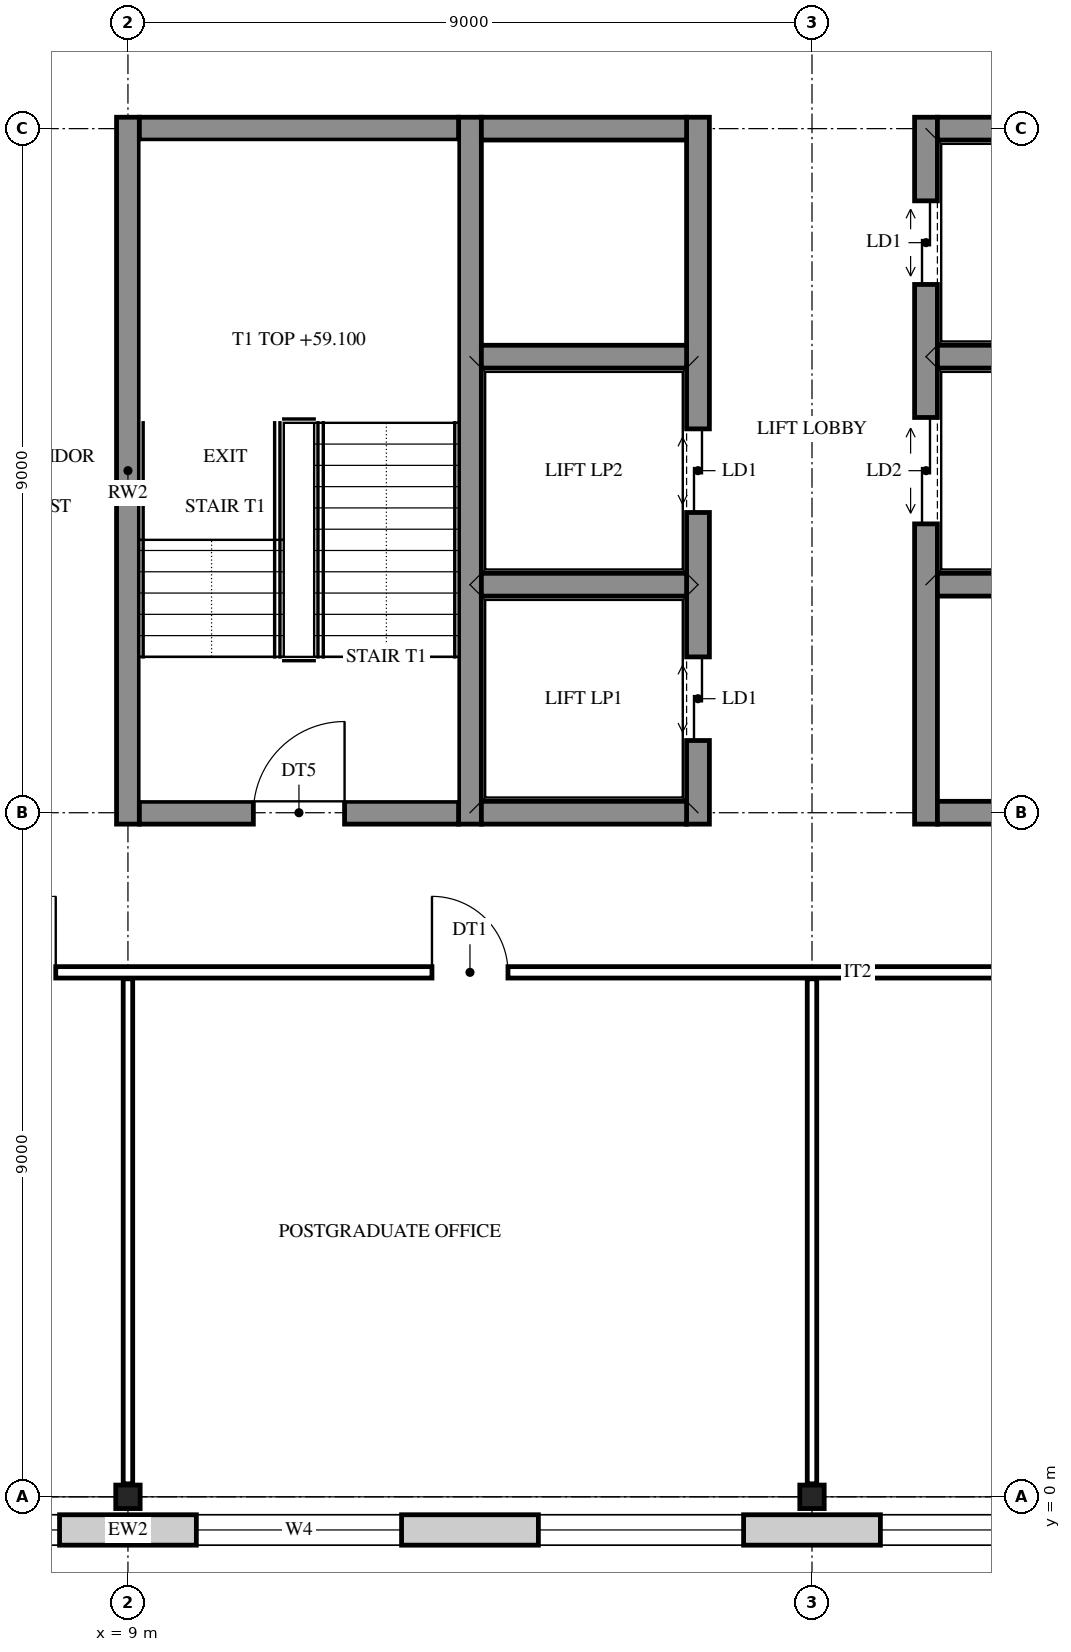
"""IFC4 building model, lengths in metres.
Left out: names, types, materials, properties, quantities, classifications, styles, units other than length and angle.
Written with IfcOpenShell. Run it as: python <this file> out.ifc"""

import sys

from ifc_helpers import new_model, si_unit, direction, frame, frame_2d, origin, origin_2d, place, context, subcontext, project, spatial, rectangle, i_section, extrude, element, fill, save


model = new_model("IFC4")
c1 = context("Model", 3, precision=1e-05, world=origin(), true_north=direction((0.0, 1.0)))
c2 = subcontext(c1, "Body", "Model", "MODEL_VIEW")
j1 = project(units=[si_unit("LENGTHUNIT", "METRE"), si_unit("PLANEANGLEUNIT", "RADIAN")], contexts=[c1])
p1 = place(None, origin())
s1 = spatial("IfcSite", under=j1, at=p1, CompositionType="ELEMENT")
p2 = place(p1, origin())
s2 = spatial("IfcBuilding", under=s1, at=p2, CompositionType="ELEMENT")
p3 = place(p2, frame((0.0, 0.0, 57.0)))
s3 = spatial("IfcBuildingStorey", under=s2, at=p3, CompositionType="ELEMENT", Elevation=57.0)
for number, where, z_axis, x_axis in (
    (1, (9.0, 0.0, 0.0), (0.0, 0.0, 1.0), (0.0, 1.0, 0.0)),
    (2, (18.0, 0.0, 0.0), (0.0, 0.0, 1.0), (0.0, 1.0, 0.0)),
):
    element("IfcColumn", number, at=place(p3, frame(where, z_axis=z_axis, x_axis=x_axis)), inside=s3, PredefinedType="COLUMN", context=c2, shape_type="SweptSolid", body=[
        extrude(i_section(OverallWidth=0.309, OverallDepth=0.321, WebThickness=0.014, FlangeThickness=0.022, FilletRadius=0.017, at=origin_2d()), origin(), (0.0, 0.0, 1.0), 4.2),
    ])
for number, where, z_axis, x_axis in (
    (3, (9.0, 8.85, 0.0), (0.0, 0.0, 1.0), (0.0, 1.0, 0.0)),
    (4, (13.5, 8.85, 0.0), (0.0, 0.0, 1.0), (0.0, 1.0, 0.0)),
):
    element("IfcWall", number, at=place(p3, frame(where, z_axis=z_axis, x_axis=x_axis)), inside=s3, PredefinedType="SHEAR", context=c2, shape_type="SweptSolid", body=[
        extrude(rectangle(XDim=9.3, YDim=0.3, at=frame_2d((4.65, 0.0))), origin(), (0.0, 0.0, 1.0), 4.2),
    ])
p4 = place(p3, frame((16.5, 8.85, 0.0), z_axis=(0.0, 0.0, 1.0), x_axis=(0.0, 1.0, 0.0)))
e5 = element("IfcWall", 5, at=p4, inside=s3, PredefinedType="SHEAR", context=c2, shape_type="SweptSolid", body=[
    extrude(rectangle(XDim=9.3, YDim=0.3, at=frame_2d((4.65, 0.0))), origin(), (0.0, 0.0, 1.0), 4.2),
])
p5 = place(p4, frame((1.1, 0.0, 0.0)))
e6 = element("IfcOpeningElement", 6, at=p5, cuts=e5, PredefinedType="OPENING", context=c2, shape_type="SweptSolid", body=[
    extrude(rectangle(XDim=1.1, YDim=2.1, at=frame_2d((0.55, 1.05))), frame((0.0, 0.16, 0.0), z_axis=(0.0, -1.0, 0.0), x_axis=(1.0, 0.0, 0.0)), (0.0, 0.0, 1.0), 0.32),
])
p6 = place(p4, frame((4.1, 0.0, 0.0)))
e7 = element("IfcOpeningElement", 7, at=p6, cuts=e5, PredefinedType="OPENING", context=c2, shape_type="SweptSolid", body=[
    extrude(rectangle(XDim=1.1, YDim=2.1, at=frame_2d((0.55, 1.05))), frame((0.0, 0.16, 0.0), z_axis=(0.0, -1.0, 0.0), x_axis=(1.0, 0.0, 0.0)), (0.0, 0.0, 1.0), 0.32),
])
p7 = place(p3, frame((19.5, 8.85, 0.0), z_axis=(0.0, 0.0, 1.0), x_axis=(0.0, 1.0, 0.0)))
e8 = element("IfcWall", 8, at=p7, inside=s3, PredefinedType="SHEAR", context=c2, shape_type="SweptSolid", body=[
    extrude(rectangle(XDim=9.3, YDim=0.3, at=frame_2d((4.65, 0.0))), origin(), (0.0, 0.0, 1.0), 4.2),
])
p8 = place(p7, frame((3.95, 0.0, 0.0)))
e9 = element("IfcOpeningElement", 9, at=p8, cuts=e8, PredefinedType="OPENING", context=c2, shape_type="SweptSolid", body=[
    extrude(rectangle(XDim=1.4, YDim=2.1, at=frame_2d((0.7, 1.05))), frame((0.0, 0.16, 0.0), z_axis=(0.0, -1.0, 0.0), x_axis=(1.0, 0.0, 0.0)), (0.0, 0.0, 1.0), 0.32),
])
p9 = place(p7, frame((7.1, 0.0, 0.0)))
e10 = element("IfcOpeningElement", 10, at=p9, cuts=e8, PredefinedType="OPENING", context=c2, shape_type="SweptSolid", body=[
    extrude(rectangle(XDim=1.1, YDim=2.1, at=frame_2d((0.55, 1.05))), frame((0.0, 0.16, 0.0), z_axis=(0.0, -1.0, 0.0), x_axis=(1.0, 0.0, 0.0)), (0.0, 0.0, 1.0), 0.32),
])
p10 = place(p3, frame((9.15, 9.0, 0.0), z_axis=(0.0, 0.0, 1.0), x_axis=(1.0, 0.0, 0.0)))
e11 = element("IfcWall", 11, at=p10, inside=s3, PredefinedType="SHEAR", context=c2, shape_type="SweptSolid", body=[
    extrude(rectangle(XDim=4.2, YDim=0.3, at=frame_2d((2.1, 0.0))), origin(), (0.0, 0.0, 1.0), 4.2),
])
p11 = place(p10, frame((1.5, 0.0, 0.0)))
e12 = element("IfcOpeningElement", 12, at=p11, cuts=e11, PredefinedType="OPENING", context=c2, shape_type="SweptSolid", body=[
    extrude(rectangle(XDim=1.2, YDim=2.1, at=frame_2d((0.6, 1.05))), frame((0.0, 0.16, 0.0), z_axis=(0.0, -1.0, 0.0), x_axis=(1.0, 0.0, 0.0)), (0.0, 0.0, 1.0), 0.32),
])
for number, where, z_axis, x_axis in (
    (13, (13.65, 9.0, 0.0), (0.0, 0.0, 1.0), (1.0, 0.0, 0.0)),
    (14, (19.65, 9.0, 0.0), (0.0, 0.0, 1.0), (1.0, 0.0, 0.0)),
    (15, (13.65, 12.0, 0.0), (0.0, 0.0, 1.0), (1.0, 0.0, 0.0)),
    (16, (19.65, 12.0, 0.0), (0.0, 0.0, 1.0), (1.0, 0.0, 0.0)),
    (17, (13.65, 15.0, 0.0), (0.0, 0.0, 1.0), (1.0, 0.0, 0.0)),
    (18, (19.65, 15.0, 0.0), (0.0, 0.0, 1.0), (1.0, 0.0, 0.0)),
):
    element("IfcWall", number, at=place(p3, frame(where, z_axis=z_axis, x_axis=x_axis)), inside=s3, PredefinedType="SHEAR", context=c2, shape_type="SweptSolid", body=[
        extrude(rectangle(XDim=2.7, YDim=0.3, at=frame_2d((1.35, 0.0))), origin(), (0.0, 0.0, 1.0), 4.2),
    ])
p12 = place(p3, frame((9.15, 18.0, 0.0), z_axis=(0.0, 0.0, 1.0), x_axis=(1.0, 0.0, 0.0)))
e19 = element("IfcWall", 19, at=p12, inside=s3, PredefinedType="SHEAR", context=c2, shape_type="SweptSolid", body=[
    extrude(rectangle(XDim=4.2, YDim=0.3, at=frame_2d((2.1, 0.0))), origin(), (0.0, 0.0, 1.0), 4.2),
])
for number, where, z_axis, x_axis in (
    (20, (13.65, 18.0, 0.0), (0.0, 0.0, 1.0), (1.0, 0.0, 0.0)),
    (21, (19.65, 18.0, 0.0), (0.0, 0.0, 1.0), (1.0, 0.0, 0.0)),
):
    element("IfcWall", number, at=place(p3, frame(where, z_axis=z_axis, x_axis=x_axis)), inside=s3, PredefinedType="SHEAR", context=c2, shape_type="SweptSolid", body=[
        extrude(rectangle(XDim=2.7, YDim=0.3, at=frame_2d((1.35, 0.0))), origin(), (0.0, 0.0, 1.0), 4.2),
    ])
p13 = place(p3, frame((32.125, -0.436, 0.0), z_axis=(0.0, 0.0, 1.0), x_axis=(-1.0, 0.0, 0.0)))
e22 = element("IfcWall", 22, at=p13, inside=s3, PredefinedType="STANDARD", context=c2, shape_type="SweptSolid", body=[
    extrude(rectangle(XDim=32.75, YDim=0.4, at=frame_2d((16.375, 0.0))), origin(), (0.0, 0.0, 1.0), 4.2),
])
p14 = place(p13, frame((28.525, 0.0, 0.9)))
e23 = element("IfcOpeningElement", 23, at=p14, cuts=e22, PredefinedType="OPENING", context=c2, shape_type="SweptSolid", body=[
    extrude(rectangle(XDim=2.7, YDim=2.5, at=frame_2d((1.35, 1.25))), frame((0.0, 0.21, 0.0), z_axis=(0.0, -1.0, 0.0), x_axis=(1.0, 0.0, 0.0)), (0.0, 0.0, 1.0), 0.42),
])
p15 = place(p13, frame((24.025, 0.0, 0.9)))
e24 = element("IfcOpeningElement", 24, at=p15, cuts=e22, PredefinedType="OPENING", context=c2, shape_type="SweptSolid", body=[
    extrude(rectangle(XDim=2.7, YDim=2.5, at=frame_2d((1.35, 1.25))), frame((0.0, 0.21, 0.0), z_axis=(0.0, -1.0, 0.0), x_axis=(1.0, 0.0, 0.0)), (0.0, 0.0, 1.0), 0.42),
])
p16 = place(p13, frame((19.525, 0.0, 0.9)))
e25 = element("IfcOpeningElement", 25, at=p16, cuts=e22, PredefinedType="OPENING", context=c2, shape_type="SweptSolid", body=[
    extrude(rectangle(XDim=2.7, YDim=2.5, at=frame_2d((1.35, 1.25))), frame((0.0, 0.21, 0.0), z_axis=(0.0, -1.0, 0.0), x_axis=(1.0, 0.0, 0.0)), (0.0, 0.0, 1.0), 0.42),
])
p17 = place(p13, frame((15.025, 0.0, 0.9)))
e26 = element("IfcOpeningElement", 26, at=p17, cuts=e22, PredefinedType="OPENING", context=c2, shape_type="SweptSolid", body=[
    extrude(rectangle(XDim=2.7, YDim=2.5, at=frame_2d((1.35, 1.25))), frame((0.0, 0.21, 0.0), z_axis=(0.0, -1.0, 0.0), x_axis=(1.0, 0.0, 0.0)), (0.0, 0.0, 1.0), 0.42),
])
p18 = place(p13, frame((10.525, 0.0, 0.9)))
e27 = element("IfcOpeningElement", 27, at=p18, cuts=e22, PredefinedType="OPENING", context=c2, shape_type="SweptSolid", body=[
    extrude(rectangle(XDim=2.7, YDim=2.5, at=frame_2d((1.35, 1.25))), frame((0.0, 0.21, 0.0), z_axis=(0.0, -1.0, 0.0), x_axis=(1.0, 0.0, 0.0)), (0.0, 0.0, 1.0), 0.42),
])
p19 = place(p13, frame((6.025, 0.0, 0.9)))
e28 = element("IfcOpeningElement", 28, at=p19, cuts=e22, PredefinedType="OPENING", context=c2, shape_type="SweptSolid", body=[
    extrude(rectangle(XDim=2.7, YDim=2.5, at=frame_2d((1.35, 1.25))), frame((0.0, 0.21, 0.0), z_axis=(0.0, -1.0, 0.0), x_axis=(1.0, 0.0, 0.0)), (0.0, 0.0, 1.0), 0.42),
])
p20 = place(p13, frame((1.525, 0.0, 0.9)))
e29 = element("IfcOpeningElement", 29, at=p20, cuts=e22, PredefinedType="OPENING", context=c2, shape_type="SweptSolid", body=[
    extrude(rectangle(XDim=2.7, YDim=2.5, at=frame_2d((1.35, 1.25))), frame((0.0, 0.21, 0.0), z_axis=(0.0, -1.0, 0.0), x_axis=(1.0, 0.0, 0.0)), (0.0, 0.0, 1.0), 0.42),
])
for number, where, z_axis, x_axis in (
    (30, (9.0, 0.17, 0.0), (0.0, 0.0, 1.0), (0.0, 1.0, 0.0)),
    (31, (18.0, 0.17, 0.0), (0.0, 0.0, 1.0), (0.0, 1.0, 0.0)),
):
    element("IfcWall", number, at=place(p3, frame(where, z_axis=z_axis, x_axis=x_axis)), inside=s3, PredefinedType="PARTITIONING", context=c2, shape_type="SweptSolid", body=[
        extrude(rectangle(XDim=6.645, YDim=0.125, at=frame_2d((3.322, 0.0))), origin(), (0.0, 0.0, 1.0), 3.542),
    ])
p21 = place(p3, frame((6.9, 6.9, 0.0), z_axis=(0.0, 0.0, 1.0), x_axis=(1.0, 0.0, 0.0)))
e32 = element("IfcWall", 32, at=p21, inside=s3, PredefinedType="PARTITIONING", context=c2, shape_type="SweptSolid", body=[
    extrude(rectangle(XDim=20.1, YDim=0.15, at=frame_2d((10.05, 0.0))), origin(), (0.0, 0.0, 1.0), 3.542),
])
p22 = place(p21, frame((0.15, 0.0, 0.0)))
e33 = element("IfcOpeningElement", 33, at=p22, cuts=e32, PredefinedType="OPENING", context=c2, shape_type="SweptSolid", body=[
    extrude(rectangle(XDim=1.0, YDim=2.1, at=frame_2d((0.5, 1.05))), frame((0.0, 0.085, 0.0), z_axis=(0.0, -1.0, 0.0), x_axis=(1.0, 0.0, 0.0)), (0.0, 0.0, 1.0), 0.17),
])
p23 = place(p21, frame((6.1, 0.0, 0.0)))
e34 = element("IfcOpeningElement", 34, at=p23, cuts=e32, PredefinedType="OPENING", context=c2, shape_type="SweptSolid", body=[
    extrude(rectangle(XDim=1.0, YDim=2.1, at=frame_2d((0.5, 1.05))), frame((0.0, 0.085, 0.0), z_axis=(0.0, -1.0, 0.0), x_axis=(1.0, 0.0, 0.0)), (0.0, 0.0, 1.0), 0.17),
])
p24 = place(p21, frame((16.3, 0.0, 0.0)))
e35 = element("IfcOpeningElement", 35, at=p24, cuts=e32, PredefinedType="OPENING", context=c2, shape_type="SweptSolid", body=[
    extrude(rectangle(XDim=1.0, YDim=2.1, at=frame_2d((0.5, 1.05))), frame((0.0, 0.085, 0.0), z_axis=(0.0, -1.0, 0.0), x_axis=(1.0, 0.0, 0.0)), (0.0, 0.0, 1.0), 0.17),
])
p25 = place(p15, origin())
e36 = element("IfcWindow", 36, at=p25, inside=s3, PartitioningType="SINGLE_PANEL", PredefinedType="WINDOW", context=c2, shape_type="SweptSolid", body=[
    extrude(rectangle(XDim=2.7, YDim=2.5, at=frame_2d((1.35, 1.25))), frame((0.0, 0.03, 0.0), z_axis=(0.0, -1.0, 0.0), x_axis=(1.0, 0.0, 0.0)), (0.0, 0.0, 1.0), 0.06),
])
fill(e24, e36)
p26 = place(p16, origin())
e37 = element("IfcWindow", 37, at=p26, inside=s3, PartitioningType="SINGLE_PANEL", PredefinedType="WINDOW", context=c2, shape_type="SweptSolid", body=[
    extrude(rectangle(XDim=2.7, YDim=2.5, at=frame_2d((1.35, 1.25))), frame((0.0, 0.03, 0.0), z_axis=(0.0, -1.0, 0.0), x_axis=(1.0, 0.0, 0.0)), (0.0, 0.0, 1.0), 0.06),
])
fill(e25, e37)
p27 = place(p17, origin())
e38 = element("IfcWindow", 38, at=p27, inside=s3, PartitioningType="SINGLE_PANEL", PredefinedType="WINDOW", context=c2, shape_type="SweptSolid", body=[
    extrude(rectangle(XDim=2.7, YDim=2.5, at=frame_2d((1.35, 1.25))), frame((0.0, 0.03, 0.0), z_axis=(0.0, -1.0, 0.0), x_axis=(1.0, 0.0, 0.0)), (0.0, 0.0, 1.0), 0.06),
])
fill(e26, e38)
p28 = place(p18, origin())
e39 = element("IfcWindow", 39, at=p28, inside=s3, PartitioningType="SINGLE_PANEL", PredefinedType="WINDOW", context=c2, shape_type="SweptSolid", body=[
    extrude(rectangle(XDim=2.7, YDim=2.5, at=frame_2d((1.35, 1.25))), frame((0.0, 0.03, 0.0), z_axis=(0.0, -1.0, 0.0), x_axis=(1.0, 0.0, 0.0)), (0.0, 0.0, 1.0), 0.06),
])
fill(e27, e39)
p29 = place(p11, origin())
e40 = element("IfcDoor", 40, at=p29, inside=s3, OperationType="SINGLE_SWING_RIGHT", PredefinedType="DOOR", context=c2, shape_type="SweptSolid", body=[
    extrude(rectangle(XDim=1.2, YDim=2.1, at=frame_2d((0.6, 1.05))), frame((0.0, 0.025, 0.0), z_axis=(0.0, -1.0, 0.0), x_axis=(1.0, 0.0, 0.0)), (0.0, 0.0, 1.0), 0.05),
])
fill(e12, e40)
p30 = place(p22, frame((1.0, 0.0, 0.0), z_axis=(0.0, 0.0, 1.0), x_axis=(-1.0, 0.0, 0.0)))
e41 = element("IfcDoor", 41, at=p30, inside=s3, OperationType="SINGLE_SWING_RIGHT", PredefinedType="DOOR", context=c2, shape_type="SweptSolid", body=[
    extrude(rectangle(XDim=1.0, YDim=2.1, at=frame_2d((0.5, 1.05))), frame((0.0, 0.025, 0.0), z_axis=(0.0, -1.0, 0.0), x_axis=(1.0, 0.0, 0.0)), (0.0, 0.0, 1.0), 0.05),
])
fill(e33, e41)
p31 = place(p23, frame((1.0, 0.0, 0.0), z_axis=(0.0, 0.0, 1.0), x_axis=(-1.0, 0.0, 0.0)))
e42 = element("IfcDoor", 42, at=p31, inside=s3, OperationType="SINGLE_SWING_LEFT", PredefinedType="DOOR", context=c2, shape_type="SweptSolid", body=[
    extrude(rectangle(XDim=1.0, YDim=2.1, at=frame_2d((0.5, 1.05))), frame((0.0, 0.025, 0.0), z_axis=(0.0, -1.0, 0.0), x_axis=(1.0, 0.0, 0.0)), (0.0, 0.0, 1.0), 0.05),
])
fill(e34, e42)
p32 = place(p5, origin())
e43 = element("IfcDoor", 43, at=p32, inside=s3, OperationType="DOUBLE_DOOR_SLIDING", PredefinedType="DOOR", context=c2, shape_type="SweptSolid", body=[
    extrude(rectangle(XDim=1.1, YDim=2.1, at=frame_2d((0.55, 1.05))), frame((0.0, 0.025, 0.0), z_axis=(0.0, -1.0, 0.0), x_axis=(1.0, 0.0, 0.0)), (0.0, 0.0, 1.0), 0.05),
])
fill(e6, e43)
p33 = place(p6, origin())
e44 = element("IfcDoor", 44, at=p33, inside=s3, OperationType="DOUBLE_DOOR_SLIDING", PredefinedType="DOOR", context=c2, shape_type="SweptSolid", body=[
    extrude(rectangle(XDim=1.1, YDim=2.1, at=frame_2d((0.55, 1.05))), frame((0.0, 0.025, 0.0), z_axis=(0.0, -1.0, 0.0), x_axis=(1.0, 0.0, 0.0)), (0.0, 0.0, 1.0), 0.05),
])
fill(e7, e44)
p34 = place(p8, origin())
e45 = element("IfcDoor", 45, at=p34, inside=s3, OperationType="DOUBLE_DOOR_SLIDING", PredefinedType="DOOR", context=c2, shape_type="SweptSolid", body=[
    extrude(rectangle(XDim=1.4, YDim=2.1, at=frame_2d((0.7, 1.05))), frame((0.0, 0.025, 0.0), z_axis=(0.0, -1.0, 0.0), x_axis=(1.0, 0.0, 0.0)), (0.0, 0.0, 1.0), 0.05),
])
fill(e9, e45)
p35 = place(p9, origin())
e46 = element("IfcDoor", 46, at=p35, inside=s3, OperationType="DOUBLE_DOOR_SLIDING", PredefinedType="DOOR", context=c2, shape_type="SweptSolid", body=[
    extrude(rectangle(XDim=1.1, YDim=2.1, at=frame_2d((0.55, 1.05))), frame((0.0, 0.025, 0.0), z_axis=(0.0, -1.0, 0.0), x_axis=(1.0, 0.0, 0.0)), (0.0, 0.0, 1.0), 0.05),
])
fill(e10, e46)
save(model, sys.argv[1])
